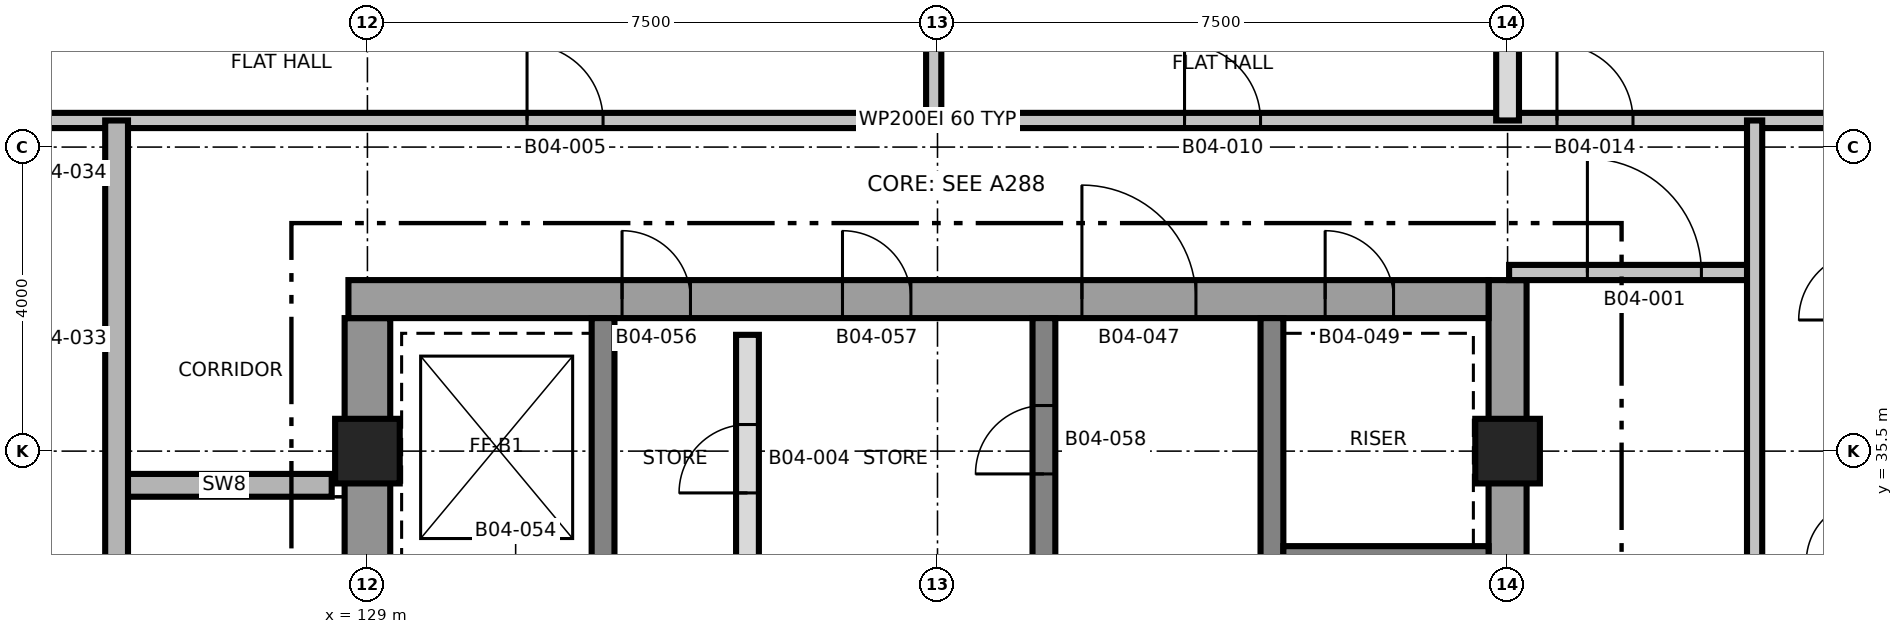
"""IFC4 building model, lengths in metres.
Left out: names, types, materials, properties, quantities, classifications, styles, units other than length and angle.
Written with IfcOpenShell. Run it as: python <this file> out.ifc"""

import sys

from ifc_helpers import new_model, si_unit, direction, frame, frame_2d, origin, origin_2d, place, context, subcontext, project, spatial, rectangle, extrude, element, fill, save


model = new_model("IFC4")
c1 = context("Model", 3, precision=1e-05, world=origin(), true_north=direction((0.0, 1.0)))
c2 = subcontext(c1, "Body", "Model", "MODEL_VIEW")
j1 = project(units=[si_unit("LENGTHUNIT", "METRE"), si_unit("PLANEANGLEUNIT", "RADIAN")], contexts=[c1])
p1 = place(None, origin())
s1 = spatial("IfcSite", under=j1, at=p1, CompositionType="ELEMENT")
p2 = place(p1, origin())
s2 = spatial("IfcBuilding", under=s1, at=p2, CompositionType="ELEMENT")
p3 = place(p2, frame((0.0, 0.0, 63.1)))
s3 = spatial("IfcBuildingStorey", under=s2, at=p3, CompositionType="ELEMENT", Elevation=63.1)
p4 = place(p3, frame((129.0, 24.75, 0.0), z_axis=(0.0, 0.0, 1.0), x_axis=(0.0, 1.0, 0.0)))
e1 = element("IfcWall", 1, at=p4, inside=s3, PredefinedType="SHEAR", context=c2, shape_type="SweptSolid", body=[
    extrude(rectangle(XDim=12.5, YDim=0.6, at=frame_2d((6.25, 0.0))), origin(), (0.0, 0.0, 1.0), 3.7),
])
p5 = place(p4, frame((5.15, 0.0, 0.0)))
e2 = element("IfcOpeningElement", 2, at=p5, cuts=e1, PredefinedType="OPENING", context=c2, shape_type="SweptSolid", body=[
    extrude(rectangle(XDim=1.0, YDim=2.1, at=frame_2d((0.5, 1.05))), frame((0.0, 0.31, 0.0), z_axis=(0.0, -1.0, 0.0), x_axis=(1.0, 0.0, 0.0)), (0.0, 0.0, 1.0), 0.62),
])
p6 = place(p3, frame((144.0, 24.25, 0.0), z_axis=(0.0, 0.0, 1.0), x_axis=(0.0, 1.0, 0.0)))
e3 = element("IfcWall", 3, at=p6, inside=s3, PredefinedType="SHEAR", context=c2, shape_type="SweptSolid", body=[
    extrude(rectangle(XDim=13.5, YDim=0.5, at=frame_2d((6.75, 0.0))), origin(), (0.0, 0.0, 1.0), 3.7),
])
p7 = place(p3, frame((128.75, 37.5, 0.0), z_axis=(0.0, 0.0, 1.0), x_axis=(1.0, 0.0, 0.0)))
e4 = element("IfcWall", 4, at=p7, inside=s3, PredefinedType="SHEAR", context=c2, shape_type="SweptSolid", body=[
    extrude(rectangle(XDim=15.0, YDim=0.5, at=frame_2d((7.5, 0.0))), origin(), (0.0, 0.0, 1.0), 3.7),
])
p8 = place(p7, frame((9.65, 0.0, 0.0)))
e5 = element("IfcOpeningElement", 5, at=p8, cuts=e4, PredefinedType="OPENING", context=c2, shape_type="SweptSolid", body=[
    extrude(rectangle(XDim=1.5, YDim=2.1, at=frame_2d((0.75, 1.05))), frame((0.0, 0.26, 0.0), z_axis=(0.0, -1.0, 0.0), x_axis=(1.0, 0.0, 0.0)), (0.0, 0.0, 1.0), 0.52),
])
p9 = place(p7, frame((12.85, 0.0, 0.0)))
e6 = element("IfcOpeningElement", 6, at=p9, cuts=e4, PredefinedType="OPENING", context=c2, shape_type="SweptSolid", body=[
    extrude(rectangle(XDim=0.9, YDim=2.1, at=frame_2d((0.45, 1.05))), frame((0.0, 0.26, 0.0), z_axis=(0.0, -1.0, 0.0), x_axis=(1.0, 0.0, 0.0)), (0.0, 0.0, 1.0), 0.52),
])
p10 = place(p7, frame((3.6, 0.0, 0.0)))
e7 = element("IfcOpeningElement", 7, at=p10, cuts=e4, PredefinedType="OPENING", context=c2, shape_type="SweptSolid", body=[
    extrude(rectangle(XDim=0.9, YDim=2.1, at=frame_2d((0.45, 1.05))), frame((0.0, 0.26, 0.0), z_axis=(0.0, -1.0, 0.0), x_axis=(1.0, 0.0, 0.0)), (0.0, 0.0, 1.0), 0.52),
])
p11 = place(p7, frame((6.5, 0.0, 0.0)))
e8 = element("IfcOpeningElement", 8, at=p11, cuts=e4, PredefinedType="OPENING", context=c2, shape_type="SweptSolid", body=[
    extrude(rectangle(XDim=0.9, YDim=2.1, at=frame_2d((0.45, 1.05))), frame((0.0, 0.26, 0.0), z_axis=(0.0, -1.0, 0.0), x_axis=(1.0, 0.0, 0.0)), (0.0, 0.0, 1.0), 0.52),
])
p12 = place(p3, frame((132.1, 24.75, 0.0), z_axis=(0.0, 0.0, 1.0), x_axis=(0.0, 1.0, 0.0)))
e9 = element("IfcWall", 9, at=p12, inside=s3, PredefinedType="SHEAR", context=c2, shape_type="SweptSolid", body=[
    extrude(rectangle(XDim=12.5, YDim=0.3, at=frame_2d((6.25, 0.0))), origin(), (0.0, 0.0, 1.0), 3.7),
])
p13 = place(p12, frame((3.9, 0.0, 0.0)))
e10 = element("IfcOpeningElement", 10, at=p13, cuts=e9, PredefinedType="OPENING", context=c2, shape_type="SweptSolid", body=[
    extrude(rectangle(XDim=1.2, YDim=2.1, at=frame_2d((0.6, 1.05))), frame((0.0, 0.16, 0.0), z_axis=(0.0, -1.0, 0.0), x_axis=(1.0, 0.0, 0.0)), (0.0, 0.0, 1.0), 0.32),
])
p14 = place(p3, frame((137.9, 24.75, 0.0), z_axis=(0.0, 0.0, 1.0), x_axis=(0.0, 1.0, 0.0)))
e11 = element("IfcWall", 11, at=p14, inside=s3, PredefinedType="SHEAR", context=c2, shape_type="SweptSolid", body=[
    extrude(rectangle(XDim=12.5, YDim=0.3, at=frame_2d((6.25, 0.0))), origin(), (0.0, 0.0, 1.0), 3.7),
])
p15 = place(p14, frame((3.95, 0.0, 0.0)))
e12 = element("IfcOpeningElement", 12, at=p15, cuts=e11, PredefinedType="OPENING", context=c2, shape_type="SweptSolid", body=[
    extrude(rectangle(XDim=1.5, YDim=2.1, at=frame_2d((0.75, 1.05))), frame((0.0, 0.16, 0.0), z_axis=(0.0, -1.0, 0.0), x_axis=(1.0, 0.0, 0.0)), (0.0, 0.0, 1.0), 0.32),
])
p16 = place(p14, frame((10.45, 0.0, 0.0)))
e13 = element("IfcOpeningElement", 13, at=p16, cuts=e11, PredefinedType="OPENING", context=c2, shape_type="SweptSolid", body=[
    extrude(rectangle(XDim=0.9, YDim=2.1, at=frame_2d((0.45, 1.05))), frame((0.0, 0.16, 0.0), z_axis=(0.0, -1.0, 0.0), x_axis=(1.0, 0.0, 0.0)), (0.0, 0.0, 1.0), 0.32),
])
p17 = place(p3, frame((140.9, 24.75, 0.0), z_axis=(0.0, 0.0, 1.0), x_axis=(0.0, 1.0, 0.0)))
e14 = element("IfcWall", 14, at=p17, inside=s3, PredefinedType="SHEAR", context=c2, shape_type="SweptSolid", body=[
    extrude(rectangle(XDim=12.5, YDim=0.3, at=frame_2d((6.25, 0.0))), origin(), (0.0, 0.0, 1.0), 3.7),
])
p18 = place(p17, frame((5.9, 0.0, 0.0)))
e15 = element("IfcOpeningElement", 15, at=p18, cuts=e14, PredefinedType="OPENING", context=c2, shape_type="SweptSolid", body=[
    extrude(rectangle(XDim=1.2, YDim=2.1, at=frame_2d((0.6, 1.05))), frame((0.0, 0.16, 0.0), z_axis=(0.0, -1.0, 0.0), x_axis=(1.0, 0.0, 0.0)), (0.0, 0.0, 1.0), 0.32),
])
p19 = place(p3, frame((141.05, 34.1, 0.0), z_axis=(0.0, 0.0, 1.0), x_axis=(1.0, 0.0, 0.0)))
e16 = element("IfcWall", 16, at=p19, inside=s3, PredefinedType="SHEAR", context=c2, shape_type="SweptSolid", body=[
    extrude(rectangle(XDim=2.7, YDim=0.3, at=frame_2d((1.35, 0.0))), origin(), (0.0, 0.0, 1.0), 3.7),
])
for number, where, z_axis, x_axis in (
    (17, (129.0, 35.5, 0.0), (0.0, 0.0, 1.0), (1.0, 0.0, 0.0)),
    (18, (144.0, 35.5, 0.0), (0.0, 0.0, 1.0), (1.0, 0.0, 0.0)),
):
    element("IfcColumn", number, at=place(p3, frame(where, z_axis=z_axis, x_axis=x_axis)), inside=s3, PredefinedType="COLUMN", context=c2, shape_type="SweptSolid", body=[
        extrude(rectangle(XDim=0.85, YDim=0.85, at=origin_2d()), origin(), (0.0, 0.0, 1.0), 3.7),
    ])
p20 = place(p3, frame((125.7, 35.05, 0.0), z_axis=(0.0, 0.0, 1.0), x_axis=(1.0, 0.0, 0.0)))
e19 = element("IfcWall", 19, at=p20, inside=s3, PredefinedType="SHEAR", context=c2, shape_type="SweptSolid", body=[
    extrude(rectangle(XDim=2.83, YDim=0.3, at=frame_2d((1.415, 0.0))), origin(), (0.0, 0.0, 1.0), 3.4),
])
p21 = place(p3, frame((144.02, 37.85, 0.0), z_axis=(0.0, 0.0, 1.0), x_axis=(1.0, 0.0, 0.0)))
e20 = element("IfcWall", 20, at=p21, inside=s3, PredefinedType="PARTITIONING", context=c2, shape_type="SweptSolid", body=[
    extrude(rectangle(XDim=3.23, YDim=0.2, at=frame_2d((1.615, 0.0))), origin(), (0.0, 0.0, 1.0), 3.4),
])
p22 = place(p21, frame((1.03, 0.0, 0.0)))
e21 = element("IfcOpeningElement", 21, at=p22, cuts=e20, PredefinedType="OPENING", context=c2, shape_type="SweptSolid", body=[
    extrude(rectangle(XDim=1.5, YDim=2.1, at=frame_2d((0.75, 1.05))), frame((0.0, 0.11, 0.0), z_axis=(0.0, -1.0, 0.0), x_axis=(1.0, 0.0, 0.0)), (0.0, 0.0, 1.0), 0.22),
])
p23 = place(p3, frame((119.17, 39.85, 0.0), z_axis=(0.0, 0.0, 1.0), x_axis=(1.0, 0.0, 0.0)))
e22 = element("IfcWall", 22, at=p23, inside=s3, PredefinedType="PARTITIONING", context=c2, shape_type="SweptSolid", body=[
    extrude(rectangle(XDim=34.66, YDim=0.2, at=frame_2d((17.33, 0.0))), origin(), (0.0, 0.0, 1.0), 3.4),
])
p24 = place(p23, frame((11.93, 0.0, 0.0)))
e23 = element("IfcOpeningElement", 23, at=p24, cuts=e22, PredefinedType="OPENING", context=c2, shape_type="SweptSolid", body=[
    extrude(rectangle(XDim=1.0, YDim=2.1, at=frame_2d((0.5, 1.05))), frame((0.0, 0.11, 0.0), z_axis=(0.0, -1.0, 0.0), x_axis=(1.0, 0.0, 0.0)), (0.0, 0.0, 1.0), 0.22),
])
p25 = place(p23, frame((20.58, 0.0, 0.0)))
e24 = element("IfcOpeningElement", 24, at=p25, cuts=e22, PredefinedType="OPENING", context=c2, shape_type="SweptSolid", body=[
    extrude(rectangle(XDim=1.0, YDim=2.1, at=frame_2d((0.5, 1.05))), frame((0.0, 0.11, 0.0), z_axis=(0.0, -1.0, 0.0), x_axis=(1.0, 0.0, 0.0)), (0.0, 0.0, 1.0), 0.22),
])
p26 = place(p23, frame((25.48, 0.0, 0.0)))
e25 = element("IfcOpeningElement", 25, at=p26, cuts=e22, PredefinedType="OPENING", context=c2, shape_type="SweptSolid", body=[
    extrude(rectangle(XDim=1.0, YDim=2.1, at=frame_2d((0.5, 1.05))), frame((0.0, 0.11, 0.0), z_axis=(0.0, -1.0, 0.0), x_axis=(1.0, 0.0, 0.0)), (0.0, 0.0, 1.0), 0.22),
])
p27 = place(p3, frame((125.7, 22.15, 0.0), z_axis=(0.0, 0.0, 1.0), x_axis=(0.0, 1.0, 0.0)))
e26 = element("IfcWall", 26, at=p27, inside=s3, PredefinedType="SHEAR", context=c2, shape_type="SweptSolid", body=[
    extrude(rectangle(XDim=17.7, YDim=0.3, at=frame_2d((8.85, 0.0))), origin(), (0.0, 0.0, 1.0), 3.4),
])
p28 = place(p27, frame((2.7, 0.0, 0.0)))
e27 = element("IfcOpeningElement", 27, at=p28, cuts=e26, PredefinedType="OPENING", context=c2, shape_type="SweptSolid", body=[
    extrude(rectangle(XDim=1.0, YDim=2.1, at=frame_2d((0.5, 1.05))), frame((0.0, 0.16, 0.0), z_axis=(0.0, -1.0, 0.0), x_axis=(1.0, 0.0, 0.0)), (0.0, 0.0, 1.0), 0.32),
])
p29 = place(p3, frame((134.0, 33.77, 0.0), z_axis=(0.0, 0.0, 1.0), x_axis=(0.0, 1.0, 0.0)))
e28 = element("IfcWall", 28, at=p29, inside=s3, PredefinedType="PARTITIONING", context=c2, shape_type="SweptSolid", body=[
    extrude(rectangle(XDim=3.26, YDim=0.3, at=frame_2d((1.63, 0.0))), origin(), (0.0, 0.0, 1.0), 3.4),
])
p30 = place(p29, frame((1.18, 0.0, 0.0)))
e29 = element("IfcOpeningElement", 29, at=p30, cuts=e28, PredefinedType="OPENING", context=c2, shape_type="SweptSolid", body=[
    extrude(rectangle(XDim=0.9, YDim=2.1, at=frame_2d((0.45, 1.05))), frame((0.0, 0.16, 0.0), z_axis=(0.0, -1.0, 0.0), x_axis=(1.0, 0.0, 0.0)), (0.0, 0.0, 1.0), 0.32),
])
p31 = place(p3, frame((136.45, 39.85, 0.0), z_axis=(0.0, 0.0, 1.0), x_axis=(0.0, 1.0, 0.0)))
e30 = element("IfcWall", 30, at=p31, inside=s3, PredefinedType="PARTITIONING", context=c2, shape_type="SweptSolid", body=[
    extrude(rectangle(XDim=6.98, YDim=0.2, at=frame_2d((3.49, 0.0))), origin(), (0.0, 0.0, 1.0), 3.4),
])
p32 = place(p3, frame((144.0, 39.85, 0.0), z_axis=(0.0, 0.0, 1.0), x_axis=(0.0, 1.0, 0.0)))
e31 = element("IfcWall", 31, at=p32, inside=s3, PredefinedType="PARTITIONING", context=c2, shape_type="SweptSolid", body=[
    extrude(rectangle(XDim=6.98, YDim=0.3, at=frame_2d((3.49, 0.0))), origin(), (0.0, 0.0, 1.0), 3.4),
])
p33 = place(p3, frame((147.25, 22.15, 0.0), z_axis=(0.0, 0.0, 1.0), x_axis=(0.0, 1.0, 0.0)))
e32 = element("IfcWall", 32, at=p33, inside=s3, PredefinedType="PARTITIONING", context=c2, shape_type="SweptSolid", body=[
    extrude(rectangle(XDim=17.7, YDim=0.2, at=frame_2d((8.85, 0.0))), origin(), (0.0, 0.0, 1.0), 3.4),
])
p34 = place(p33, frame((2.65, 0.0, 0.0)))
e33 = element("IfcOpeningElement", 33, at=p34, cuts=e32, PredefinedType="OPENING", context=c2, shape_type="SweptSolid", body=[
    extrude(rectangle(XDim=1.0, YDim=2.1, at=frame_2d((0.5, 1.05))), frame((0.0, 0.11, 0.0), z_axis=(0.0, -1.0, 0.0), x_axis=(1.0, 0.0, 0.0)), (0.0, 0.0, 1.0), 0.22),
])
p35 = place(p22, origin())
e34 = element("IfcDoor", 34, at=p35, inside=s3, OperationType="SINGLE_SWING_LEFT", PredefinedType="DOOR", context=c2, shape_type="SweptSolid", body=[
    extrude(rectangle(XDim=1.5, YDim=2.1, at=frame_2d((0.75, 1.05))), frame((0.0, 0.025, 0.0), z_axis=(0.0, -1.0, 0.0), x_axis=(1.0, 0.0, 0.0)), (0.0, 0.0, 1.0), 0.05),
])
fill(e21, e34)
p36 = place(p30, origin())
e35 = element("IfcDoor", 35, at=p36, inside=s3, OperationType="SINGLE_SWING_RIGHT", PredefinedType="DOOR", context=c2, shape_type="SweptSolid", body=[
    extrude(rectangle(XDim=0.9, YDim=2.1, at=frame_2d((0.45, 1.05))), frame((0.0, 0.025, 0.0), z_axis=(0.0, -1.0, 0.0), x_axis=(1.0, 0.0, 0.0)), (0.0, 0.0, 1.0), 0.05),
])
fill(e29, e35)
p37 = place(p24, origin())
e36 = element("IfcDoor", 36, at=p37, inside=s3, OperationType="SINGLE_SWING_LEFT", PredefinedType="DOOR", context=c2, shape_type="SweptSolid", body=[
    extrude(rectangle(XDim=1.0, YDim=2.1, at=frame_2d((0.5, 1.05))), frame((0.0, 0.025, 0.0), z_axis=(0.0, -1.0, 0.0), x_axis=(1.0, 0.0, 0.0)), (0.0, 0.0, 1.0), 0.05),
])
fill(e23, e36)
p38 = place(p25, origin())
e37 = element("IfcDoor", 37, at=p38, inside=s3, OperationType="SINGLE_SWING_RIGHT", PredefinedType="DOOR", context=c2, shape_type="SweptSolid", body=[
    extrude(rectangle(XDim=1.0, YDim=2.1, at=frame_2d((0.5, 1.05))), frame((0.0, 0.025, 0.0), z_axis=(0.0, -1.0, 0.0), x_axis=(1.0, 0.0, 0.0)), (0.0, 0.0, 1.0), 0.05),
])
fill(e24, e37)
p39 = place(p26, origin())
e38 = element("IfcDoor", 38, at=p39, inside=s3, OperationType="SINGLE_SWING_RIGHT", PredefinedType="DOOR", context=c2, shape_type="SweptSolid", body=[
    extrude(rectangle(XDim=1.0, YDim=2.1, at=frame_2d((0.5, 1.05))), frame((0.0, 0.025, 0.0), z_axis=(0.0, -1.0, 0.0), x_axis=(1.0, 0.0, 0.0)), (0.0, 0.0, 1.0), 0.05),
])
fill(e25, e38)
p40 = place(p8, origin())
e39 = element("IfcDoor", 39, at=p40, inside=s3, OperationType="SINGLE_SWING_RIGHT", PredefinedType="DOOR", context=c2, shape_type="SweptSolid", body=[
    extrude(rectangle(XDim=1.5, YDim=2.1, at=frame_2d((0.75, 1.05))), frame((0.0, 0.025, 0.0), z_axis=(0.0, -1.0, 0.0), x_axis=(1.0, 0.0, 0.0)), (0.0, 0.0, 1.0), 0.05),
])
fill(e5, e39)
p41 = place(p9, origin())
e40 = element("IfcDoor", 40, at=p41, inside=s3, OperationType="SINGLE_SWING_RIGHT", PredefinedType="DOOR", context=c2, shape_type="SweptSolid", body=[
    extrude(rectangle(XDim=0.9, YDim=2.1, at=frame_2d((0.45, 1.05))), frame((0.0, 0.025, 0.0), z_axis=(0.0, -1.0, 0.0), x_axis=(1.0, 0.0, 0.0)), (0.0, 0.0, 1.0), 0.05),
])
fill(e6, e40)
p42 = place(p10, origin())
e41 = element("IfcDoor", 41, at=p42, inside=s3, OperationType="SINGLE_SWING_LEFT", PredefinedType="DOOR", context=c2, shape_type="SweptSolid", body=[
    extrude(rectangle(XDim=0.9, YDim=2.1, at=frame_2d((0.45, 1.05))), frame((0.0, 0.025, 0.0), z_axis=(0.0, -1.0, 0.0), x_axis=(1.0, 0.0, 0.0)), (0.0, 0.0, 1.0), 0.05),
])
fill(e7, e41)
p43 = place(p11, origin())
e42 = element("IfcDoor", 42, at=p43, inside=s3, OperationType="SINGLE_SWING_RIGHT", PredefinedType="DOOR", context=c2, shape_type="SweptSolid", body=[
    extrude(rectangle(XDim=0.9, YDim=2.1, at=frame_2d((0.45, 1.05))), frame((0.0, 0.025, 0.0), z_axis=(0.0, -1.0, 0.0), x_axis=(1.0, 0.0, 0.0)), (0.0, 0.0, 1.0), 0.05),
])
fill(e8, e42)
p44 = place(p16, origin())
e43 = element("IfcDoor", 43, at=p44, inside=s3, OperationType="SINGLE_SWING_RIGHT", PredefinedType="DOOR", context=c2, shape_type="SweptSolid", body=[
    extrude(rectangle(XDim=0.9, YDim=2.1, at=frame_2d((0.45, 1.05))), frame((0.0, 0.025, 0.0), z_axis=(0.0, -1.0, 0.0), x_axis=(1.0, 0.0, 0.0)), (0.0, 0.0, 1.0), 0.05),
])
fill(e13, e43)
save(model, sys.argv[1])
